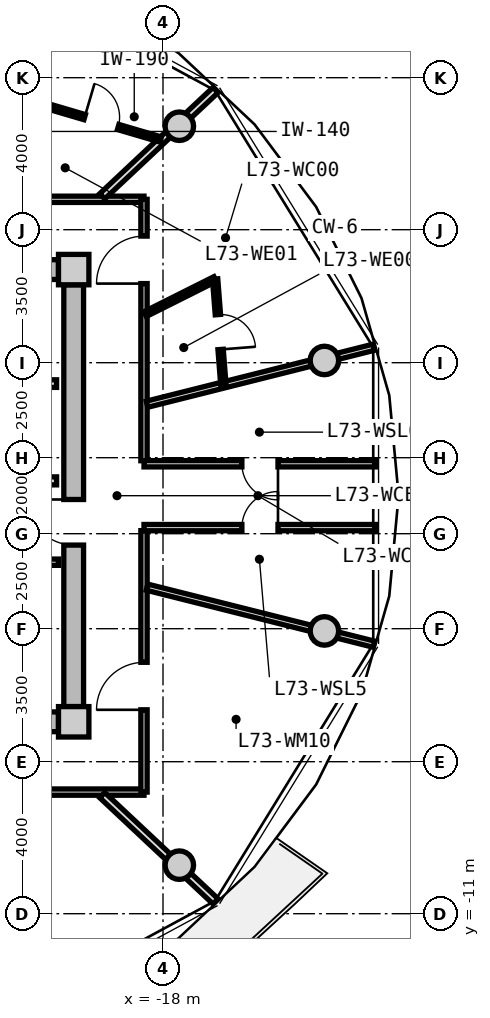
"""IFC4 building model, lengths in metres.
Left out: names, types, materials, properties, quantities, classifications, styles, units other than length and angle.
Written with IfcOpenShell. Run it as: python <this file> out.ifc"""

import sys

from ifc_helpers import new_model, si_unit, direction, frame, frame_2d, origin, origin_2d, place, context, subcontext, project, spatial, rectangle, circle, extrude, source, transform, mapped, element, fill, save


model = new_model("IFC4")
c1 = context("Model", 3, precision=1e-05, world=origin(), true_north=direction((0.0, 1.0)))
c2 = subcontext(c1, "Body", "Model", "MODEL_VIEW")
j1 = project(units=[si_unit("LENGTHUNIT", "METRE"), si_unit("PLANEANGLEUNIT", "RADIAN")], contexts=[c1])
p1 = place(None, origin())
s1 = spatial("IfcSite", under=j1, at=p1, CompositionType="ELEMENT")
p2 = place(p1, origin())
s2 = spatial("IfcBuilding", under=s1, at=p2, CompositionType="ELEMENT")
p3 = place(p2, frame((0.0, 0.0, 235.25)))
s3 = spatial("IfcBuildingStorey", under=s2, at=p3, CompositionType="ELEMENT", Elevation=235.25)
m1 = source(origin(), c2, "Body", "SweptSolid", [
    extrude(rectangle(XDim=0.8, YDim=0.8, at=origin_2d()), origin(), (0.0, 0.0, 1.0), 3.05),
])
for number, where, z_axis, x_axis in (
    (1, (-20.35, -5.95, 0.0), (0.0, 0.0, 1.0), (1.0, 0.0, 0.0)),
    (2, (-20.35, 5.95, 0.0), (0.0, 0.0, 1.0), (1.0, 0.0, 0.0)),
):
    element("IfcColumn", number, at=place(p3, frame(where, z_axis=z_axis, x_axis=x_axis)), inside=s3, PredefinedType="COLUMN", context=c2, shape_type="MappedRepresentation", body=[
        mapped(m1, transform((0.0, 0.0, 0.0), x_axis=(1.0, 0.0, 0.0), y_axis=(0.0, 1.0, 0.0), z_axis=(0.0, 0.0, 1.0), scale=1.0)),
    ])
m2 = source(origin(), c2, "Body", "SweptSolid", [
    extrude(rectangle(XDim=14.5, YDim=0.52, at=frame_2d((7.25, 0.0))), origin(), (0.0, 0.0, 1.0), 2.81),
])
for number, where, z_axis, x_axis in (
    (3, (-35.25, 5.95, 0.0), (0.0, 0.0, 1.0), (1.0, 0.0, 0.0)),
    (4, (-20.75, -5.95, 0.0), (0.0, 0.0, 1.0), (-1.0, 0.0, 0.0)),
):
    element("IfcWall", number, at=place(p3, frame(where, z_axis=z_axis, x_axis=x_axis)), inside=s3, PredefinedType="SHEAR", context=c2, shape_type="MappedRepresentation", body=[
        mapped(m2, transform((0.0, 0.0, 0.0), x_axis=(1.0, 0.0, 0.0), y_axis=(0.0, 1.0, 0.0), z_axis=(0.0, 0.0, 1.0), scale=1.0)),
    ])
m3 = source(origin(), c2, "Body", "SweptSolid", [
    extrude(rectangle(XDim=11.1, YDim=0.52, at=frame_2d((5.55, 0.0))), origin(), (0.0, 0.0, 1.0), 2.81),
])
p4 = place(p3, frame((-20.35, 5.55, 0.0), z_axis=(0.0, 0.0, 1.0), x_axis=(0.0, -1.0, 0.0)))
e5 = element("IfcWall", 5, at=p4, inside=s3, PredefinedType="SHEAR", context=c2, shape_type="MappedRepresentation", body=[
    mapped(m3, transform((0.0, 0.0, 0.0), x_axis=(1.0, 0.0, 0.0), y_axis=(0.0, 1.0, 0.0), z_axis=(0.0, 0.0, 1.0), scale=1.0)),
])
p5 = place(p4, frame((5.65, 0.0, 0.0)))
e6 = element("IfcOpeningElement", 6, at=p5, cuts=e5, PredefinedType="OPENING", context=c2, shape_type="SweptSolid", body=[
    extrude(rectangle(XDim=1.2, YDim=2.15, at=frame_2d((0.6, 1.075))), frame((0.0, 0.27, 0.0), z_axis=(0.0, -1.0, 0.0), x_axis=(1.0, 0.0, 0.0)), (0.0, 0.0, 1.0), 0.54),
])
m4 = source(origin(), c2, "Body", "SweptSolid", [
    extrude(circle(Radius=0.375, at=origin_2d()), origin(), (0.0, 0.0, 1.0), 3.05),
])
for number, where, z_axis, x_axis in (
    (7, (-13.753, 3.559, 0.0), (0.0, 0.0, 1.0), (1.0, 0.0, 0.0)),
    (8, (-17.57, 9.723, 0.0), (0.0, 0.0, 1.0), (1.0, 0.0, 0.0)),
    (9, (-17.57, -9.723, 0.0), (0.0, 0.0, 1.0), (1.0, 0.0, 0.0)),
    (10, (-13.753, -3.559, 0.0), (0.0, 0.0, 1.0), (1.0, 0.0, 0.0)),
):
    element("IfcColumn", number, at=place(p3, frame(where, z_axis=z_axis, x_axis=x_axis)), inside=s3, PredefinedType="COLUMN", context=c2, shape_type="MappedRepresentation", body=[
        mapped(m4, transform((0.0, 0.0, 0.0), x_axis=(1.0, 0.0, 0.0), y_axis=(0.0, 1.0, 0.0), z_axis=(0.0, 0.0, 1.0), scale=1.0)),
    ])
m5 = source(origin(), c2, "Body", "SweptSolid", [
    extrude(rectangle(XDim=3.2, YDim=0.2, at=frame_2d((1.6, 0.0))), origin(), (0.0, 0.0, 1.0), 2.795),
])
p6 = place(p3, frame((-24.0, 2.95, 0.0), z_axis=(0.0, 0.0, 1.0), x_axis=(1.0, 0.0, 0.0)))
e11 = element("IfcWall", 11, at=p6, inside=s3, PredefinedType="PARTITIONING", context=c2, shape_type="MappedRepresentation", body=[
    mapped(m5, transform((0.0, 0.0, 0.0), x_axis=(1.0, 0.0, 0.0), y_axis=(0.0, 1.0, 0.0), z_axis=(0.0, 0.0, 1.0), scale=1.0)),
])
m6 = source(origin(), c2, "Body", "SweptSolid", [
    extrude(rectangle(XDim=6.66, YDim=0.21, at=frame_2d((3.33, 0.0))), origin(), (0.0, 0.0, 1.0), 2.795),
])
p7 = place(p3, frame((-27.46, 0.39, 0.0), z_axis=(0.0, 0.0, 1.0), x_axis=(1.0, 0.0, 0.0)))
e12 = element("IfcWall", 12, at=p7, inside=s3, PredefinedType="PARTITIONING", context=c2, shape_type="MappedRepresentation", body=[
    mapped(m6, transform((0.0, 0.0, 0.0), x_axis=(1.0, 0.0, 0.0), y_axis=(0.0, 1.0, 0.0), z_axis=(0.0, 0.0, 1.0), scale=1.0)),
])
p8 = place(p7, frame((1.0, 0.0, 0.0)))
e13 = element("IfcOpeningElement", 13, at=p8, cuts=e12, PredefinedType="OPENING", context=c2, shape_type="SweptSolid", body=[
    extrude(rectangle(XDim=1.2, YDim=2.15, at=frame_2d((0.6, 1.075))), frame((0.0, 0.115, 0.0), z_axis=(0.0, -1.0, 0.0), x_axis=(1.0, 0.0, 0.0)), (0.0, 0.0, 1.0), 0.23),
])
m7 = source(origin(), c2, "Body", "SweptSolid", [
    extrude(rectangle(XDim=2.7, YDim=0.165, at=frame_2d((1.35, 0.0))), origin(), (0.0, 0.0, 1.0), 2.795),
])
p9 = place(p3, frame((-23.45, -1.75, 0.0), z_axis=(0.0, 0.0, 1.0), x_axis=(1.0, 0.0, 0.0)))
e14 = element("IfcWall", 14, at=p9, inside=s3, PredefinedType="PARTITIONING", context=c2, shape_type="MappedRepresentation", body=[
    mapped(m7, transform((0.0, 0.0, 0.0), x_axis=(1.0, 0.0, 0.0), y_axis=(0.0, 1.0, 0.0), z_axis=(0.0, 0.0, 1.0), scale=1.0)),
])
p10 = place(p9, frame((0.85, 0.0, 0.0)))
e15 = element("IfcOpeningElement", 15, at=p10, cuts=e14, PredefinedType="OPENING", context=c2, shape_type="SweptSolid", body=[
    extrude(rectangle(XDim=0.925, YDim=2.1, at=frame_2d((0.462, 1.05))), frame((0.0, 0.093, 0.0), z_axis=(0.0, -1.0, 0.0), x_axis=(1.0, 0.0, 0.0)), (0.0, 0.0, 1.0), 0.185),
])
m8 = source(origin(), c2, "Body", "SweptSolid", [
    extrude(rectangle(XDim=8.58, YDim=0.165, at=frame_2d((4.29, 0.0))), origin(), (0.0, 0.0, 1.0), 2.795),
])
p11 = place(p3, frame((-27.08, 7.8, 0.0), z_axis=(0.0, 0.0, 1.0), x_axis=(1.0, 0.0, 0.0)))
e16 = element("IfcWall", 16, at=p11, inside=s3, PredefinedType="PARTITIONING", context=c2, shape_type="MappedRepresentation", body=[
    mapped(m8, transform((0.0, 0.0, 0.0), x_axis=(1.0, 0.0, 0.0), y_axis=(0.0, 1.0, 0.0), z_axis=(0.0, 0.0, 1.0), scale=1.0)),
])
p12 = place(p11, frame((2.18, 0.0, 0.0)))
e17 = element("IfcOpeningElement", 17, at=p12, cuts=e16, PredefinedType="OPENING", context=c2, shape_type="SweptSolid", body=[
    extrude(rectangle(XDim=1.25, YDim=2.2, at=frame_2d((0.625, 1.1))), frame((0.0, 0.093, 0.0), z_axis=(0.0, -1.0, 0.0), x_axis=(1.0, 0.0, 0.0)), (0.0, 0.0, 1.0), 0.185),
])
m9 = source(origin(), c2, "Body", "SweptSolid", [
    extrude(rectangle(XDim=19.0, YDim=0.165, at=frame_2d((9.5, 0.0))), origin(), (0.0, 0.0, 1.0), 2.795),
])
p13 = place(p3, frame((-18.5, -7.8, 0.0), z_axis=(0.0, 0.0, 1.0), x_axis=(-1.0, 0.0, 0.0)))
e18 = element("IfcWall", 18, at=p13, inside=s3, PredefinedType="PARTITIONING", context=c2, shape_type="MappedRepresentation", body=[
    mapped(m9, transform((0.0, 0.0, 0.0), x_axis=(1.0, 0.0, 0.0), y_axis=(0.0, 1.0, 0.0), z_axis=(0.0, 0.0, 1.0), scale=1.0)),
])
p14 = place(p13, frame((15.586, 0.0, 0.0)))
e19 = element("IfcOpeningElement", 19, at=p14, cuts=e18, PredefinedType="OPENING", context=c2, shape_type="SweptSolid", body=[
    extrude(rectangle(XDim=1.05, YDim=2.15, at=frame_2d((0.525, 1.075))), frame((0.0, 0.093, 0.0), z_axis=(0.0, -1.0, 0.0), x_axis=(1.0, 0.0, 0.0)), (0.0, 0.0, 1.0), 0.185),
])
p15 = place(p13, frame((12.465, 0.0, 0.0)))
e20 = element("IfcOpeningElement", 20, at=p15, cuts=e18, PredefinedType="OPENING", context=c2, shape_type="SweptSolid", body=[
    extrude(rectangle(XDim=1.05, YDim=2.15, at=frame_2d((0.525, 1.075))), frame((0.0, 0.093, 0.0), z_axis=(0.0, -1.0, 0.0), x_axis=(1.0, 0.0, 0.0)), (0.0, 0.0, 1.0), 0.185),
])
p16 = place(p13, frame((8.875, 0.0, 0.0)))
e21 = element("IfcOpeningElement", 21, at=p16, cuts=e18, PredefinedType="OPENING", context=c2, shape_type="SweptSolid", body=[
    extrude(rectangle(XDim=1.25, YDim=2.2, at=frame_2d((0.625, 1.1))), frame((0.0, 0.093, 0.0), z_axis=(0.0, -1.0, 0.0), x_axis=(1.0, 0.0, 0.0)), (0.0, 0.0, 1.0), 0.185),
])
p17 = place(p13, frame((3.559, 0.0, 0.0)))
e22 = element("IfcOpeningElement", 22, at=p17, cuts=e18, PredefinedType="OPENING", context=c2, shape_type="SweptSolid", body=[
    extrude(rectangle(XDim=1.25, YDim=2.2, at=frame_2d((0.625, 1.1))), frame((0.0, 0.093, 0.0), z_axis=(0.0, -1.0, 0.0), x_axis=(1.0, 0.0, 0.0)), (0.0, 0.0, 1.0), 0.185),
])
m10 = source(origin(), c2, "Body", "SweptSolid", [
    extrude(rectangle(XDim=6.88, YDim=0.165, at=frame_2d((3.44, 0.0))), origin(), (0.0, 0.0, 1.0), 2.795),
])
p18 = place(p3, frame((-18.5, 7.8, 0.0), z_axis=(0.0, 0.0, 1.0), x_axis=(0.0, -1.0, 0.0)))
e23 = element("IfcWall", 23, at=p18, inside=s3, PredefinedType="PARTITIONING", context=c2, shape_type="MappedRepresentation", body=[
    mapped(m10, transform((0.0, 0.0, 0.0), x_axis=(1.0, 0.0, 0.0), y_axis=(0.0, 1.0, 0.0), z_axis=(0.0, 0.0, 1.0), scale=1.0)),
])
p19 = place(p18, frame((0.968, 0.0, 0.0)))
e24 = element("IfcOpeningElement", 24, at=p19, cuts=e23, PredefinedType="OPENING", context=c2, shape_type="SweptSolid", body=[
    extrude(rectangle(XDim=1.25, YDim=2.2, at=frame_2d((0.625, 1.1))), frame((0.0, 0.093, 0.0), z_axis=(0.0, -1.0, 0.0), x_axis=(1.0, 0.0, 0.0)), (0.0, 0.0, 1.0), 0.185),
])
p20 = place(p3, frame((-18.5, -0.92, 0.0), z_axis=(0.0, 0.0, 1.0), x_axis=(0.0, -1.0, 0.0)))
e25 = element("IfcWall", 25, at=p20, inside=s3, PredefinedType="PARTITIONING", context=c2, shape_type="MappedRepresentation", body=[
    mapped(m10, transform((0.0, 0.0, 0.0), x_axis=(1.0, 0.0, 0.0), y_axis=(0.0, 1.0, 0.0), z_axis=(0.0, 0.0, 1.0), scale=1.0)),
])
p21 = place(p20, frame((3.464, 0.0, 0.0)))
e26 = element("IfcOpeningElement", 26, at=p21, cuts=e25, PredefinedType="OPENING", context=c2, shape_type="SweptSolid", body=[
    extrude(rectangle(XDim=1.25, YDim=2.2, at=frame_2d((0.625, 1.1))), frame((0.0, 0.093, 0.0), z_axis=(0.0, -1.0, 0.0), x_axis=(1.0, 0.0, 0.0)), (0.0, 0.0, 1.0), 0.185),
])
m11 = source(origin(), c2, "Body", "SweptSolid", [
    extrude(rectangle(XDim=6.157, YDim=0.165, at=frame_2d((3.079, 0.0))), origin(), (0.0, 0.0, 1.0), 2.395),
])
for number, where, z_axis, x_axis in (
    (27, (-18.42, -2.407, 0.0), (0.0, 0.0, 1.0), (0.97, -0.244, 0.0)),
    (28, (-18.42, 2.407, 0.0), (0.0, 0.0, 1.0), (0.97, 0.244, 0.0)),
):
    element("IfcWall", number, at=place(p3, frame(where, z_axis=z_axis, x_axis=x_axis)), inside=s3, PredefinedType="PARTITIONING", context=c2, shape_type="MappedRepresentation", body=[
        mapped(m11, transform((0.0, 0.0, 0.0), x_axis=(1.0, 0.0, 0.0), y_axis=(0.0, 1.0, 0.0), z_axis=(0.0, 0.0, 1.0), scale=1.0)),
    ])
m12 = source(origin(), c2, "Body", "SweptSolid", [
    extrude(rectangle(XDim=6.101, YDim=0.165, at=frame_2d((3.051, 0.0))), origin(), (0.0, 0.0, 1.0), 2.795),
])
p22 = place(p3, frame((-18.5, 0.84, 0.0), z_axis=(0.0, 0.0, 1.0), x_axis=(1.0, 0.0, 0.0)))
e29 = element("IfcWall", 29, at=p22, inside=s3, PredefinedType="PARTITIONING", context=c2, shape_type="MappedRepresentation", body=[
    mapped(m12, transform((0.0, 0.0, 0.0), x_axis=(1.0, 0.0, 0.0), y_axis=(0.0, 1.0, 0.0), z_axis=(0.0, 0.0, 1.0), scale=1.0)),
])
p23 = place(p22, frame((2.576, 0.0, 0.0)))
e30 = element("IfcOpeningElement", 30, at=p23, cuts=e29, PredefinedType="OPENING", context=c2, shape_type="SweptSolid", body=[
    extrude(rectangle(XDim=0.95, YDim=2.1, at=frame_2d((0.475, 1.05))), frame((0.0, 0.093, 0.0), z_axis=(0.0, -1.0, 0.0), x_axis=(1.0, 0.0, 0.0)), (0.0, 0.0, 1.0), 0.185),
])
p24 = place(p3, frame((-12.399, -0.84, 0.0), z_axis=(0.0, 0.0, 1.0), x_axis=(-1.0, 0.0, 0.0)))
e31 = element("IfcWall", 31, at=p24, inside=s3, PredefinedType="PARTITIONING", context=c2, shape_type="MappedRepresentation", body=[
    mapped(m12, transform((0.0, 0.0, 0.0), x_axis=(1.0, 0.0, 0.0), y_axis=(0.0, 1.0, 0.0), z_axis=(0.0, 0.0, 1.0), scale=1.0)),
])
p25 = place(p24, frame((2.576, 0.0, 0.0)))
e32 = element("IfcOpeningElement", 32, at=p25, cuts=e31, PredefinedType="OPENING", context=c2, shape_type="SweptSolid", body=[
    extrude(rectangle(XDim=0.95, YDim=2.1, at=frame_2d((0.475, 1.05))), frame((0.0, 0.093, 0.0), z_axis=(0.0, -1.0, 0.0), x_axis=(1.0, 0.0, 0.0)), (0.0, 0.0, 1.0), 0.185),
])
m13 = source(origin(), c2, "Body", "SweptSolid", [
    extrude(rectangle(XDim=4.089, YDim=0.19, at=frame_2d((2.044, 0.0))), origin(), (0.0, 0.0, 1.0), 2.395),
])
p26 = place(p3, frame((-19.598, 7.88, 0.0), z_axis=(0.0, 0.0, 1.0), x_axis=(0.729401273609, 0.684086092577, 0.0)))
e33 = element("IfcWall", 33, at=p26, inside=s3, PredefinedType="PARTITIONING", context=c2, shape_type="MappedRepresentation", body=[
    mapped(m13, transform((0.0, 0.0, 0.0), x_axis=(1.0, 0.0, 0.0), y_axis=(0.0, 1.0, 0.0), z_axis=(0.0, 0.0, 1.0), scale=1.0)),
])
m14 = source(origin(), c2, "Body", "SweptSolid", [
    extrude(rectangle(XDim=2.06, YDim=0.14, at=frame_2d((1.03, 0.0))), origin(), (0.0, 0.0, 1.0), 2.795),
])
p27 = place(p3, frame((-18.47, 4.778, 0.0), z_axis=(0.0, 0.0, 1.0), x_axis=(0.893952568722, 0.448161583444, 0.0)))
e34 = element("IfcWall", 34, at=p27, inside=s3, PredefinedType="PARTITIONING", context=c2, shape_type="MappedRepresentation", body=[
    mapped(m14, transform((0.0, 0.0, 0.0), x_axis=(1.0, 0.0, 0.0), y_axis=(0.0, 1.0, 0.0), z_axis=(0.0, 0.0, 1.0), scale=1.0)),
])
m15 = source(origin(), c2, "Body", "SweptSolid", [
    extrude(rectangle(XDim=2.798, YDim=0.14, at=frame_2d((1.399, 0.0))), origin(), (0.0, 0.0, 1.0), 2.795),
])
p28 = place(p3, frame((-16.629, 5.701, 0.0), z_axis=(0.0, 0.0, 1.0), x_axis=(0.077823984089, -0.996967114553, 0.0)))
e35 = element("IfcWall", 35, at=p28, inside=s3, PredefinedType="PARTITIONING", context=c2, shape_type="MappedRepresentation", body=[
    mapped(m15, transform((0.0, 0.0, 0.0), x_axis=(1.0, 0.0, 0.0), y_axis=(0.0, 1.0, 0.0), z_axis=(0.0, 0.0, 1.0), scale=1.0)),
])
p29 = place(p28, frame((0.939, 0.0, 0.0)))
e36 = element("IfcOpeningElement", 36, at=p29, cuts=e35, PredefinedType="OPENING", context=c2, shape_type="SweptSolid", body=[
    extrude(rectangle(XDim=0.92, YDim=2.1, at=frame_2d((0.46, 1.05))), frame((0.0, 0.08, 0.0), z_axis=(0.0, -1.0, 0.0), x_axis=(1.0, 0.0, 0.0)), (0.0, 0.0, 1.0), 0.16),
])
m16 = source(origin(), c2, "Body", "SweptSolid", [
    extrude(rectangle(XDim=3.252, YDim=0.14, at=frame_2d((1.626, 0.0))), origin(), (0.0, 0.0, 1.0), 2.795),
])
p30 = place(p3, frame((-21.18, 10.291, 0.0), z_axis=(0.0, 0.0, 1.0), x_axis=(0.959294945864, -0.282406102695, 0.0)))
e37 = element("IfcWall", 37, at=p30, inside=s3, PredefinedType="PARTITIONING", context=c2, shape_type="MappedRepresentation", body=[
    mapped(m16, transform((0.0, 0.0, 0.0), x_axis=(1.0, 0.0, 0.0), y_axis=(0.0, 1.0, 0.0), z_axis=(0.0, 0.0, 1.0), scale=1.0)),
])
p31 = place(p30, frame((1.166, 0.0, 0.0)))
e38 = element("IfcOpeningElement", 38, at=p31, cuts=e37, PredefinedType="OPENING", context=c2, shape_type="SweptSolid", body=[
    extrude(rectangle(XDim=0.92, YDim=2.1, at=frame_2d((0.46, 1.05))), frame((0.0, 0.08, 0.0), z_axis=(0.0, -1.0, 0.0), x_axis=(1.0, 0.0, 0.0)), (0.0, 0.0, 1.0), 0.16),
])
p32 = place(p3, frame((-19.598, -7.88, 0.0), z_axis=(0.0, 0.0, 1.0), x_axis=(0.729401273609, -0.684086092577, 0.0)))
e39 = element("IfcWall", 39, at=p32, inside=s3, PredefinedType="PARTITIONING", context=c2, shape_type="MappedRepresentation", body=[
    mapped(m13, transform((0.0, 0.0, 0.0), x_axis=(1.0, 0.0, 0.0), y_axis=(0.0, 1.0, 0.0), z_axis=(0.0, 0.0, 1.0), scale=1.0)),
])
m17 = source(origin(), c2, "Body", "SweptSolid", [
    extrude(rectangle(XDim=1.2, YDim=2.15, at=frame_2d((0.6, 1.075))), frame((0.0, 0.025, 0.0), z_axis=(0.0, -1.0, 0.0), x_axis=(1.0, 0.0, 0.0)), (0.0, 0.0, 1.0), 0.05),
])
p33 = place(p5, frame((1.2, 0.0, 0.0), z_axis=(0.0, 0.0, 1.0), x_axis=(-1.0, 0.0, 0.0)))
e40 = element("IfcDoor", 40, at=p33, inside=s3, OperationType="SINGLE_SWING_RIGHT", PredefinedType="DOOR", context=c2, shape_type="MappedRepresentation", body=[
    mapped(m17, transform((0.0, 0.0, 0.0), x_axis=(1.0, 0.0, 0.0), y_axis=(0.0, 1.0, 0.0), z_axis=(0.0, 0.0, 1.0), scale=1.0)),
])
fill(e6, e40)
m18 = source(origin(), c2, "Body", "SweptSolid", [
    extrude(rectangle(XDim=0.95, YDim=2.1, at=frame_2d((0.475, 1.05))), frame((0.0, 0.025, 0.0), z_axis=(0.0, -1.0, 0.0), x_axis=(1.0, 0.0, 0.0)), (0.0, 0.0, 1.0), 0.05),
])
p34 = place(p25, frame((0.95, 0.0, 0.0), z_axis=(0.0, 0.0, 1.0), x_axis=(-1.0, 0.0, 0.0)))
e41 = element("IfcDoor", 41, at=p34, inside=s3, OperationType="SINGLE_SWING_RIGHT", PredefinedType="DOOR", context=c2, shape_type="MappedRepresentation", body=[
    mapped(m18, transform((0.0, 0.0, 0.0), x_axis=(1.0, 0.0, 0.0), y_axis=(0.0, 1.0, 0.0), z_axis=(0.0, 0.0, 1.0), scale=1.0)),
])
fill(e32, e41)
p35 = place(p23, frame((0.95, 0.0, 0.0), z_axis=(0.0, 0.0, 1.0), x_axis=(-1.0, 0.0, 0.0)))
e42 = element("IfcDoor", 42, at=p35, inside=s3, OperationType="SINGLE_SWING_LEFT", PredefinedType="DOOR", context=c2, shape_type="MappedRepresentation", body=[
    mapped(m18, transform((0.0, 0.0, 0.0), x_axis=(1.0, 0.0, 0.0), y_axis=(0.0, 1.0, 0.0), z_axis=(0.0, 0.0, 1.0), scale=1.0)),
])
fill(e30, e42)
m19 = source(origin(), c2, "Body", "SweptSolid", [
    extrude(rectangle(XDim=1.25, YDim=2.2, at=frame_2d((0.625, 1.1))), frame((0.0, 0.025, 0.0), z_axis=(0.0, -1.0, 0.0), x_axis=(1.0, 0.0, 0.0)), (0.0, 0.0, 1.0), 0.05),
])
p36 = place(p19, frame((1.25, 0.0, 0.0), z_axis=(0.0, 0.0, 1.0), x_axis=(-1.0, 0.0, 0.0)))
e43 = element("IfcDoor", 43, at=p36, inside=s3, OperationType="SINGLE_SWING_LEFT", PredefinedType="DOOR", context=c2, shape_type="MappedRepresentation", body=[
    mapped(m19, transform((0.0, 0.0, 0.0), x_axis=(1.0, 0.0, 0.0), y_axis=(0.0, 1.0, 0.0), z_axis=(0.0, 0.0, 1.0), scale=1.0)),
])
fill(e24, e43)
m20 = source(origin(), c2, "Body", "SweptSolid", [
    extrude(rectangle(XDim=0.92, YDim=2.1, at=frame_2d((0.46, 1.05))), frame((0.0, 0.025, 0.0), z_axis=(0.0, -1.0, 0.0), x_axis=(1.0, 0.0, 0.0)), (0.0, 0.0, 1.0), 0.05),
])
p37 = place(p29, origin())
e44 = element("IfcDoor", 44, at=p37, inside=s3, OperationType="SINGLE_SWING_RIGHT", PredefinedType="DOOR", context=c2, shape_type="MappedRepresentation", body=[
    mapped(m20, transform((0.0, 0.0, 0.0), x_axis=(1.0, 0.0, 0.0), y_axis=(0.0, 1.0, 0.0), z_axis=(0.0, 0.0, 1.0), scale=1.0)),
])
fill(e36, e44)
p38 = place(p31, origin())
e45 = element("IfcDoor", 45, at=p38, inside=s3, OperationType="SINGLE_SWING_LEFT", PredefinedType="DOOR", context=c2, shape_type="MappedRepresentation", body=[
    mapped(m20, transform((0.0, 0.0, 0.0), x_axis=(1.0, 0.0, 0.0), y_axis=(0.0, 1.0, 0.0), z_axis=(0.0, 0.0, 1.0), scale=1.0)),
])
fill(e38, e45)
p39 = place(p21, frame((1.25, 0.0, 0.0), z_axis=(0.0, 0.0, 1.0), x_axis=(-1.0, 0.0, 0.0)))
e46 = element("IfcDoor", 46, at=p39, inside=s3, OperationType="SINGLE_SWING_LEFT", PredefinedType="DOOR", context=c2, shape_type="MappedRepresentation", body=[
    mapped(m19, transform((0.0, 0.0, 0.0), x_axis=(1.0, 0.0, 0.0), y_axis=(0.0, 1.0, 0.0), z_axis=(0.0, 0.0, 1.0), scale=1.0)),
])
fill(e26, e46)
save(model, sys.argv[1])
